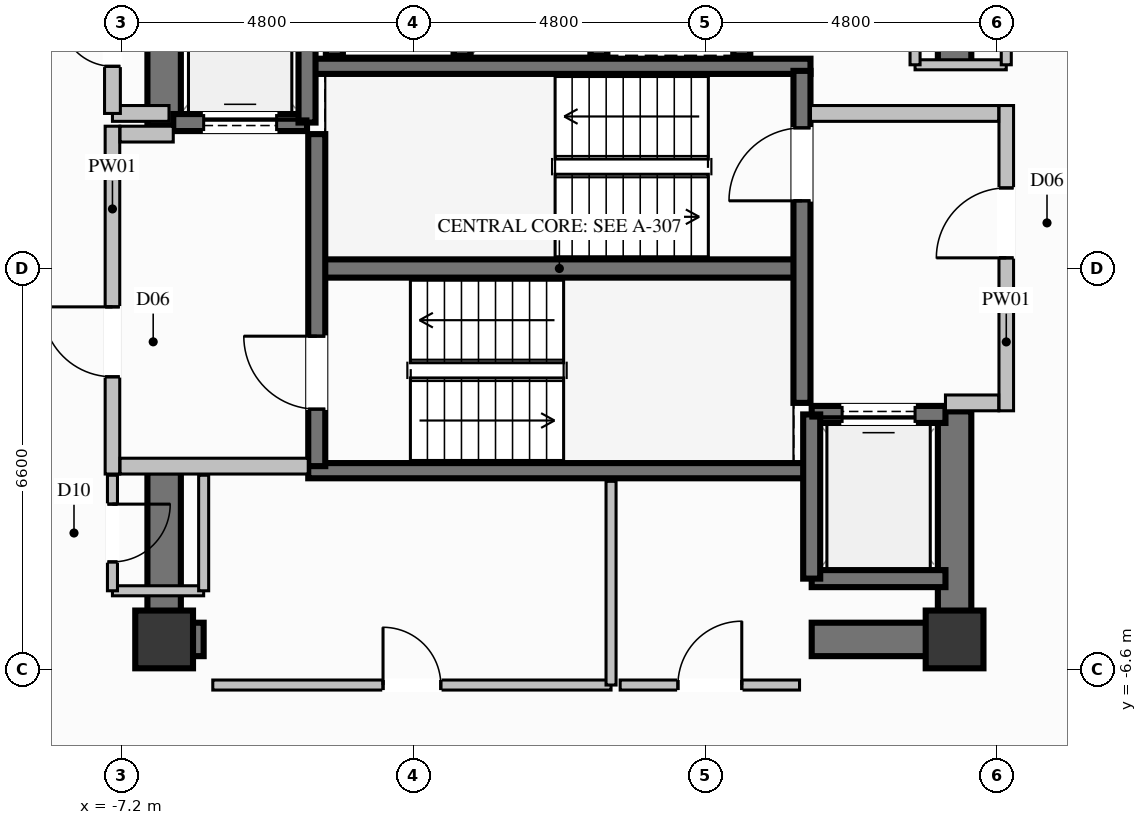
"""IFC4 building model, lengths in metres.
Left out: names, types, materials, properties, quantities, classifications, styles, units other than length and angle.
Written with IfcOpenShell. Run it as: python <this file> out.ifc"""

import sys

from ifc_helpers import new_model, si_unit, direction, frame, frame_2d, origin, origin_2d, place, context, subcontext, project, spatial, rectangle, extrude, element, fill, save


model = new_model("IFC4")
c1 = context("Model", 3, precision=1e-05, world=origin(), true_north=direction((0.0, 1.0)))
c2 = subcontext(c1, "Body", "Model", "MODEL_VIEW")
j1 = project(units=[si_unit("LENGTHUNIT", "METRE"), si_unit("PLANEANGLEUNIT", "RADIAN")], contexts=[c1])
p1 = place(None, origin())
s1 = spatial("IfcSite", under=j1, at=p1, CompositionType="ELEMENT")
p2 = place(p1, origin())
s2 = spatial("IfcBuilding", under=s1, at=p2, CompositionType="ELEMENT")
p3 = place(p2, frame((0.0, 0.0, 227.2)))
s3 = spatial("IfcBuildingStorey", under=s2, at=p3, CompositionType="ELEMENT", Elevation=227.2)
for number, where, z_axis, x_axis in (
    (1, (-6.5, -6.1, 0.0), (0.0, 0.0, 1.0), (1.0, 0.0, 0.0)),
    (2, (6.5, -6.1, 0.0), (0.0, 0.0, 1.0), (1.0, 0.0, 0.0)),
):
    element("IfcColumn", number, at=place(p3, frame(where, z_axis=z_axis, x_axis=x_axis)), inside=s3, PredefinedType="COLUMN", context=c2, shape_type="SweptSolid", body=[
        extrude(rectangle(XDim=0.95, YDim=0.95, at=origin_2d()), origin(), (0.0, 0.0, 1.0), 3.6),
    ])
p4 = place(p3, frame((-3.99, 0.0, 0.0), z_axis=(0.0, 0.0, 1.0), x_axis=(1.0, 0.0, 0.0)))
e3 = element("IfcWall", 3, at=p4, inside=s3, PredefinedType="SHEAR", context=c2, shape_type="SweptSolid", body=[
    extrude(rectangle(XDim=7.98, YDim=0.3, at=frame_2d((3.99, 0.0))), origin(), (0.0, 0.0, 1.0), 3.6),
])
for number, where, z_axis, x_axis in (
    (4, (-4.13, -3.325, 0.0), (0.0, 0.0, 1.0), (1.0, 0.0, 0.0)),
    (5, (-4.13, 3.325, 0.0), (0.0, 0.0, 1.0), (1.0, 0.0, 0.0)),
):
    element("IfcWall", number, at=place(p3, frame(where, z_axis=z_axis, x_axis=x_axis)), inside=s3, PredefinedType="SOLIDWALL", context=c2, shape_type="SweptSolid", body=[
        extrude(rectangle(XDim=8.26, YDim=0.25, at=frame_2d((4.13, 0.0))), origin(), (0.0, 0.0, 1.0), 3.6),
    ])
p5 = place(p3, frame((-6.225, -6.1, 0.0), z_axis=(0.0, 0.0, 1.0), x_axis=(1.0, 0.0, 0.0)))
e6 = element("IfcWall", 6, at=p5, inside=s3, PredefinedType="SHEAR", context=c2, shape_type="SweptSolid", body=[
    extrude(rectangle(XDim=0.375, YDim=0.55, at=frame_2d((0.188, 0.0))), origin(), (0.0, 0.0, 1.0), 3.6),
])
p6 = place(p3, frame((4.15, -6.1, 0.0), z_axis=(0.0, 0.0, 1.0), x_axis=(1.0, 0.0, 0.0)))
e7 = element("IfcWall", 7, at=p6, inside=s3, PredefinedType="SHEAR", context=c2, shape_type="SweptSolid", body=[
    extrude(rectangle(XDim=2.075, YDim=0.55, at=frame_2d((1.038, 0.0))), origin(), (0.0, 0.0, 1.0), 3.6),
])
p7 = place(p3, frame((-6.5, 2.35, 0.0), z_axis=(0.0, 0.0, 1.0), x_axis=(0.0, 1.0, 0.0)))
e8 = element("IfcWall", 8, at=p7, inside=s3, PredefinedType="SHEAR", context=c2, shape_type="SweptSolid", body=[
    extrude(rectangle(XDim=4.025, YDim=0.55, at=frame_2d((2.012, 0.0))), origin(), (0.0, 0.0, 1.0), 3.6),
])
p8 = place(p3, frame((-6.5, -6.375, 0.0), z_axis=(0.0, 0.0, 1.0), x_axis=(0.0, 1.0, 0.0)))
e9 = element("IfcWall", 9, at=p8, inside=s3, PredefinedType="SHEAR", context=c2, shape_type="SweptSolid", body=[
    extrude(rectangle(XDim=3.025, YDim=0.55, at=frame_2d((1.512, 0.0))), origin(), (0.0, 0.0, 1.0), 3.6),
])
p9 = place(p3, frame((6.5, -6.375, 0.0), z_axis=(0.0, 0.0, 1.0), x_axis=(0.0, 1.0, 0.0)))
e10 = element("IfcWall", 10, at=p9, inside=s3, PredefinedType="SHEAR", context=c2, shape_type="SweptSolid", body=[
    extrude(rectangle(XDim=4.025, YDim=0.55, at=frame_2d((2.012, 0.0))), origin(), (0.0, 0.0, 1.0), 3.6),
])
p10 = place(p3, frame((6.5, 3.35, 0.0), z_axis=(0.0, 0.0, 1.0), x_axis=(0.0, 1.0, 0.0)))
e11 = element("IfcWall", 11, at=p10, inside=s3, PredefinedType="SHEAR", context=c2, shape_type="SweptSolid", body=[
    extrude(rectangle(XDim=3.025, YDim=0.55, at=frame_2d((1.512, 0.0))), origin(), (0.0, 0.0, 1.0), 3.6),
])
for number, where, z_axis, x_axis in (
    (12, (-3.7, 6.0, 0.0), (0.0, 0.0, 1.0), (0.0, -1.0, 0.0)),
    (13, (-1.6, 3.5, 0.0), (0.0, 0.0, 1.0), (0.0, 1.0, 0.0)),
    (14, (0.65, 3.5, 0.0), (0.0, 0.0, 1.0), (0.0, 1.0, 0.0)),
    (15, (3.0, 3.5, 0.0), (0.0, 0.0, 1.0), (0.0, 1.0, 0.0)),
):
    element("IfcWall", number, at=place(p3, frame(where, z_axis=z_axis, x_axis=x_axis)), inside=s3, PredefinedType="SOLIDWALL", context=c2, shape_type="SweptSolid", body=[
        extrude(rectangle(XDim=2.5, YDim=0.28, at=frame_2d((1.25, 0.0))), origin(), (0.0, 0.0, 1.0), 3.36),
    ])
p11 = place(p3, frame((-6.35, 2.4, 0.0), z_axis=(0.0, 0.0, 1.0), x_axis=(1.0, 0.0, 0.0)))
e16 = element("IfcWall", 16, at=p11, inside=s3, PredefinedType="SOLIDWALL", context=c2, shape_type="SweptSolid", body=[
    extrude(rectangle(XDim=2.2, YDim=0.28, at=frame_2d((1.1, 0.0))), origin(), (0.0, 0.0, 1.0), 3.36),
])
p12 = place(p11, frame((0.5, 0.0, 0.0)))
e17 = element("IfcOpeningElement", 17, at=p12, cuts=e16, PredefinedType="OPENING", context=c2, shape_type="SweptSolid", body=[
    extrude(rectangle(XDim=1.2, YDim=2.2, at=frame_2d((0.6, 1.1))), frame((0.0, 0.15, 0.0), z_axis=(0.0, -1.0, 0.0), x_axis=(1.0, 0.0, 0.0)), (0.0, 0.0, 1.0), 0.3),
])
p13 = place(p3, frame((-4.15, 2.4, 0.0), z_axis=(0.0, 0.0, 1.0), x_axis=(0.0, 1.0, 0.0)))
e18 = element("IfcWall", 18, at=p13, inside=s3, PredefinedType="SOLIDWALL", context=c2, shape_type="SweptSolid", body=[
    extrude(rectangle(XDim=2.7, YDim=0.28, at=frame_2d((1.35, 0.0))), origin(), (0.0, 0.0, 1.0), 3.36),
])
p14 = place(p3, frame((4.15, -5.1, 0.0), z_axis=(0.0, 0.0, 1.0), x_axis=(1.0, 0.0, 0.0)))
e19 = element("IfcWall", 19, at=p14, inside=s3, PredefinedType="SOLIDWALL", context=c2, shape_type="SweptSolid", body=[
    extrude(rectangle(XDim=2.2, YDim=0.28, at=frame_2d((1.1, 0.0))), origin(), (0.0, 0.0, 1.0), 3.36),
])
p15 = place(p3, frame((6.35, -2.4, 0.0), z_axis=(0.0, 0.0, 1.0), x_axis=(-1.0, 0.0, 0.0)))
e20 = element("IfcWall", 20, at=p15, inside=s3, PredefinedType="SOLIDWALL", context=c2, shape_type="SweptSolid", body=[
    extrude(rectangle(XDim=2.2, YDim=0.28, at=frame_2d((1.1, 0.0))), origin(), (0.0, 0.0, 1.0), 3.36),
])
p16 = place(p15, frame((0.5, 0.0, 0.0)))
e21 = element("IfcOpeningElement", 21, at=p16, cuts=e20, PredefinedType="OPENING", context=c2, shape_type="SweptSolid", body=[
    extrude(rectangle(XDim=1.2, YDim=2.2, at=frame_2d((0.6, 1.1))), frame((0.0, 0.15, 0.0), z_axis=(0.0, -1.0, 0.0), x_axis=(1.0, 0.0, 0.0)), (0.0, 0.0, 1.0), 0.3),
])
p17 = place(p3, frame((4.15, -2.4, 0.0), z_axis=(0.0, 0.0, 1.0), x_axis=(0.0, -1.0, 0.0)))
e22 = element("IfcWall", 22, at=p17, inside=s3, PredefinedType="SOLIDWALL", context=c2, shape_type="SweptSolid", body=[
    extrude(rectangle(XDim=2.7, YDim=0.28, at=frame_2d((1.35, 0.0))), origin(), (0.0, 0.0, 1.0), 3.36),
])
p18 = place(p3, frame((-3.99, -3.25, 0.0), z_axis=(0.0, 0.0, 1.0), x_axis=(0.0, 1.0, 0.0)))
e23 = element("IfcWall", 23, at=p18, inside=s3, PredefinedType="SOLIDWALL", context=c2, shape_type="SweptSolid", body=[
    extrude(rectangle(XDim=5.46, YDim=0.28, at=frame_2d((2.73, 0.0))), origin(), (0.0, 0.0, 1.0), 3.36),
])
p19 = place(p18, frame((0.937, 0.0, 0.0)))
e24 = element("IfcOpeningElement", 24, at=p19, cuts=e23, PredefinedType="OPENING", context=c2, shape_type="SweptSolid", body=[
    extrude(rectangle(XDim=1.2, YDim=2.2, at=frame_2d((0.6, 1.1))), frame((0.0, 0.15, 0.0), z_axis=(0.0, -1.0, 0.0), x_axis=(1.0, 0.0, 0.0)), (0.0, 0.0, 1.0), 0.3),
])
p20 = place(p3, frame((3.99, -2.21, 0.0), z_axis=(0.0, 0.0, 1.0), x_axis=(0.0, 1.0, 0.0)))
e25 = element("IfcWall", 25, at=p20, inside=s3, PredefinedType="SOLIDWALL", context=c2, shape_type="SweptSolid", body=[
    extrude(rectangle(XDim=5.46, YDim=0.28, at=frame_2d((2.73, 0.0))), origin(), (0.0, 0.0, 1.0), 3.36),
])
p21 = place(p20, frame((3.323, 0.0, 0.0)))
e26 = element("IfcOpeningElement", 26, at=p21, cuts=e25, PredefinedType="OPENING", context=c2, shape_type="SweptSolid", body=[
    extrude(rectangle(XDim=1.2, YDim=2.2, at=frame_2d((0.6, 1.1))), frame((0.0, 0.15, 0.0), z_axis=(0.0, -1.0, 0.0), x_axis=(1.0, 0.0, 0.0)), (0.0, 0.0, 1.0), 0.3),
])
p22 = place(p3, frame((-7.35, -3.38, 0.0), z_axis=(0.0, 0.0, 1.0), x_axis=(0.0, 1.0, 0.0)))
e27 = element("IfcWall", 27, at=p22, inside=s3, PredefinedType="PARTITIONING", context=c2, shape_type="SweptSolid", body=[
    extrude(rectangle(XDim=5.72, YDim=0.24, at=frame_2d((2.86, 0.0))), origin(), (0.0, 0.0, 1.0), 2.445),
])
p23 = place(p22, frame((1.599, 0.0, 0.0)))
e28 = element("IfcOpeningElement", 28, at=p23, cuts=e27, PredefinedType="OPENING", context=c2, shape_type="SweptSolid", body=[
    extrude(rectangle(XDim=1.15, YDim=2.2, at=frame_2d((0.575, 1.1))), frame((0.0, 0.13, 0.0), z_axis=(0.0, -1.0, 0.0), x_axis=(1.0, 0.0, 0.0)), (0.0, 0.0, 1.0), 0.26),
])
p24 = place(p3, frame((-7.225, -3.25, 0.0), z_axis=(0.0, 0.0, 1.0), x_axis=(1.0, 0.0, 0.0)))
e29 = element("IfcWall", 29, at=p24, inside=s3, PredefinedType="PARTITIONING", context=c2, shape_type="SweptSolid", body=[
    extrude(rectangle(XDim=3.095, YDim=0.26, at=frame_2d((1.548, 0.0))), origin(), (0.0, 0.0, 1.0), 3.36),
])
p25 = place(p3, frame((-7.225, 2.21, 0.0), z_axis=(0.0, 0.0, 1.0), x_axis=(1.0, 0.0, 0.0)))
e30 = element("IfcWall", 30, at=p25, inside=s3, PredefinedType="PARTITIONING", context=c2, shape_type="SweptSolid", body=[
    extrude(rectangle(XDim=0.875, YDim=0.26, at=frame_2d((0.438, 0.0))), origin(), (0.0, 0.0, 1.0), 3.36),
])
p26 = place(p3, frame((7.35, -2.34, 0.0), z_axis=(0.0, 0.0, 1.0), x_axis=(0.0, 1.0, 0.0)))
e31 = element("IfcWall", 31, at=p26, inside=s3, PredefinedType="PARTITIONING", context=c2, shape_type="SweptSolid", body=[
    extrude(rectangle(XDim=5.02, YDim=0.24, at=frame_2d((2.51, 0.0))), origin(), (0.0, 0.0, 1.0), 2.445),
])
p27 = place(p26, frame((2.515, 0.0, 0.0)))
e32 = element("IfcOpeningElement", 32, at=p27, cuts=e31, PredefinedType="OPENING", context=c2, shape_type="SweptSolid", body=[
    extrude(rectangle(XDim=1.15, YDim=2.2, at=frame_2d((0.575, 1.1))), frame((0.0, 0.13, 0.0), z_axis=(0.0, -1.0, 0.0), x_axis=(1.0, 0.0, 0.0)), (0.0, 0.0, 1.0), 0.26),
])
p28 = place(p3, frame((6.35, -2.21, 0.0), z_axis=(0.0, 0.0, 1.0), x_axis=(1.0, 0.0, 0.0)))
e33 = element("IfcWall", 33, at=p28, inside=s3, PredefinedType="PARTITIONING", context=c2, shape_type="SweptSolid", body=[
    extrude(rectangle(XDim=0.875, YDim=0.26, at=frame_2d((0.438, 0.0))), origin(), (0.0, 0.0, 1.0), 3.36),
])
p29 = place(p3, frame((4.13, 2.55, 0.0), z_axis=(0.0, 0.0, 1.0), x_axis=(1.0, 0.0, 0.0)))
e34 = element("IfcWall", 34, at=p29, inside=s3, PredefinedType="PARTITIONING", context=c2, shape_type="SweptSolid", body=[
    extrude(rectangle(XDim=3.095, YDim=0.26, at=frame_2d((1.548, 0.0))), origin(), (0.0, 0.0, 1.0), 3.36),
])
p30 = place(p3, frame((-7.35, 2.55, 0.0), z_axis=(0.0, 0.0, 1.0), x_axis=(1.0, 0.0, 0.0)))
e35 = element("IfcWall", 35, at=p30, inside=s3, PredefinedType="PARTITIONING", context=c2, shape_type="SweptSolid", body=[
    extrude(rectangle(XDim=0.93, YDim=0.26, at=frame_2d((0.465, 0.0))), origin(), (0.0, 0.0, 1.0), 3.36),
])
p31 = place(p3, frame((-7.35, 2.55, 0.0), z_axis=(0.0, 0.0, 1.0), x_axis=(0.0, 1.0, 0.0)))
e36 = element("IfcWall", 36, at=p31, inside=s3, PredefinedType="PARTITIONING", context=c2, shape_type="SweptSolid", body=[
    extrude(rectangle(XDim=2.4, YDim=0.26, at=frame_2d((1.2, 0.0))), origin(), (0.0, 0.0, 1.0), 2.445),
])
p32 = place(p31, frame((0.775, 0.0, 0.0)))
e37 = element("IfcOpeningElement", 37, at=p32, cuts=e36, PredefinedType="OPENING", context=c2, shape_type="SweptSolid", body=[
    extrude(rectangle(XDim=0.85, YDim=2.05, at=frame_2d((0.425, 1.025))), frame((0.0, 0.14, 0.0), z_axis=(0.0, -1.0, 0.0), x_axis=(1.0, 0.0, 0.0)), (0.0, 0.0, 1.0), 0.28),
])
p33 = place(p3, frame((-7.35, -5.3, 0.0), z_axis=(0.0, 0.0, 1.0), x_axis=(1.0, 0.0, 0.0)))
e38 = element("IfcWall", 38, at=p33, inside=s3, PredefinedType="PARTITIONING", context=c2, shape_type="SweptSolid", body=[
    extrude(rectangle(XDim=1.5, YDim=0.165, at=frame_2d((0.75, 0.0))), origin(), (0.0, 0.0, 1.0), 2.445),
])
p34 = place(p3, frame((-5.85, -5.3, 0.0), z_axis=(0.0, 0.0, 1.0), x_axis=(0.0, 1.0, 0.0)))
e39 = element("IfcWall", 39, at=p34, inside=s3, PredefinedType="PARTITIONING", context=c2, shape_type="SweptSolid", body=[
    extrude(rectangle(XDim=1.9, YDim=0.165, at=frame_2d((0.95, 0.0))), origin(), (0.0, 0.0, 1.0), 2.445),
])
p35 = place(p3, frame((-7.35, -3.4, 0.0), z_axis=(0.0, 0.0, 1.0), x_axis=(0.0, -1.0, 0.0)))
e40 = element("IfcWall", 40, at=p35, inside=s3, PredefinedType="PARTITIONING", context=c2, shape_type="SweptSolid", body=[
    extrude(rectangle(XDim=1.9, YDim=0.165, at=frame_2d((0.95, 0.0))), origin(), (0.0, 0.0, 1.0), 3.36),
])
p36 = place(p35, frame((0.475, 0.0, 0.0)))
e41 = element("IfcOpeningElement", 41, at=p36, cuts=e40, PredefinedType="OPENING", context=c2, shape_type="SweptSolid", body=[
    extrude(rectangle(XDim=0.95, YDim=2.1, at=frame_2d((0.475, 1.05))), frame((0.0, 0.093, 0.0), z_axis=(0.0, -1.0, 0.0), x_axis=(1.0, 0.0, 0.0)), (0.0, 0.0, 1.0), 0.185),
])
p37 = place(p3, frame((5.85, 3.35, 0.0), z_axis=(0.0, 0.0, 1.0), x_axis=(1.0, 0.0, 0.0)))
e42 = element("IfcWall", 42, at=p37, inside=s3, PredefinedType="PARTITIONING", context=c2, shape_type="SweptSolid", body=[
    extrude(rectangle(XDim=1.5, YDim=0.165, at=frame_2d((0.75, 0.0))), origin(), (0.0, 0.0, 1.0), 3.36),
])
p38 = place(p3, frame((7.35, 3.35, 0.0), z_axis=(0.0, 0.0, 1.0), x_axis=(0.0, 1.0, 0.0)))
e43 = element("IfcWall", 43, at=p38, inside=s3, PredefinedType="PARTITIONING", context=c2, shape_type="SweptSolid", body=[
    extrude(rectangle(XDim=1.95, YDim=0.165, at=frame_2d((0.975, 0.0))), origin(), (0.0, 0.0, 1.0), 3.36),
])
p39 = place(p38, frame((0.5, 0.0, 0.0)))
e44 = element("IfcOpeningElement", 44, at=p39, cuts=e43, PredefinedType="OPENING", context=c2, shape_type="SweptSolid", body=[
    extrude(rectangle(XDim=0.95, YDim=2.1, at=frame_2d((0.475, 1.05))), frame((0.0, 0.093, 0.0), z_axis=(0.0, -1.0, 0.0), x_axis=(1.0, 0.0, 0.0)), (0.0, 0.0, 1.0), 0.185),
])
p40 = place(p3, frame((5.85, 5.3, 0.0), z_axis=(0.0, 0.0, 1.0), x_axis=(0.0, -1.0, 0.0)))
e45 = element("IfcWall", 45, at=p40, inside=s3, PredefinedType="PARTITIONING", context=c2, shape_type="SweptSolid", body=[
    extrude(rectangle(XDim=1.95, YDim=0.165, at=frame_2d((0.975, 0.0))), origin(), (0.0, 0.0, 1.0), 2.445),
])
p41 = place(p3, frame((-5.7, -6.85, 0.0), z_axis=(0.0, 0.0, 1.0), x_axis=(1.0, 0.0, 0.0)))
e46 = element("IfcWall", 46, at=p41, inside=s3, PredefinedType="PARTITIONING", context=c2, shape_type="SweptSolid", body=[
    extrude(rectangle(XDim=6.55, YDim=0.165, at=frame_2d((3.275, 0.0))), origin(), (0.0, 0.0, 1.0), 2.445),
])
p42 = place(p41, frame((2.8, 0.0, 0.0)))
e47 = element("IfcOpeningElement", 47, at=p42, cuts=e46, PredefinedType="OPENING", context=c2, shape_type="SweptSolid", body=[
    extrude(rectangle(XDim=0.95, YDim=2.1, at=frame_2d((0.475, 1.05))), frame((0.0, 0.093, 0.0), z_axis=(0.0, -1.0, 0.0), x_axis=(1.0, 0.0, 0.0)), (0.0, 0.0, 1.0), 0.185),
])
p43 = place(p3, frame((0.85, -6.85, 0.0), z_axis=(0.0, 0.0, 1.0), x_axis=(0.0, 1.0, 0.0)))
e48 = element("IfcWall", 48, at=p43, inside=s3, PredefinedType="PARTITIONING", context=c2, shape_type="SweptSolid", body=[
    extrude(rectangle(XDim=3.35, YDim=0.165, at=frame_2d((1.675, 0.0))), origin(), (0.0, 0.0, 1.0), 3.36),
])
p44 = place(p3, frame((1.0, -6.85, 0.0), z_axis=(0.0, 0.0, 1.0), x_axis=(1.0, 0.0, 0.0)))
e49 = element("IfcWall", 49, at=p44, inside=s3, PredefinedType="PARTITIONING", context=c2, shape_type="SweptSolid", body=[
    extrude(rectangle(XDim=2.95, YDim=0.165, at=frame_2d((1.475, 0.0))), origin(), (0.0, 0.0, 1.0), 2.445),
])
p45 = place(p44, frame((0.95, 0.0, 0.0)))
e50 = element("IfcOpeningElement", 50, at=p45, cuts=e49, PredefinedType="OPENING", context=c2, shape_type="SweptSolid", body=[
    extrude(rectangle(XDim=1.05, YDim=2.15, at=frame_2d((0.525, 1.075))), frame((0.0, 0.093, 0.0), z_axis=(0.0, -1.0, 0.0), x_axis=(1.0, 0.0, 0.0)), (0.0, 0.0, 1.0), 0.185),
])
p46 = place(p12, origin())
e51 = element("IfcDoor", 51, at=p46, inside=s3, OperationType="SLIDING_TO_LEFT", PredefinedType="DOOR", context=c2, shape_type="SweptSolid", body=[
    extrude(rectangle(XDim=1.2, YDim=2.2, at=frame_2d((0.6, 1.1))), frame((0.0, 0.025, 0.0), z_axis=(0.0, -1.0, 0.0), x_axis=(1.0, 0.0, 0.0)), (0.0, 0.0, 1.0), 0.05),
])
fill(e17, e51)
p47 = place(p16, origin())
e52 = element("IfcDoor", 52, at=p47, inside=s3, OperationType="SLIDING_TO_LEFT", PredefinedType="DOOR", context=c2, shape_type="SweptSolid", body=[
    extrude(rectangle(XDim=1.2, YDim=2.2, at=frame_2d((0.6, 1.1))), frame((0.0, 0.025, 0.0), z_axis=(0.0, -1.0, 0.0), x_axis=(1.0, 0.0, 0.0)), (0.0, 0.0, 1.0), 0.05),
])
fill(e21, e52)
p48 = place(p19, origin())
e53 = element("IfcDoor", 53, at=p48, inside=s3, OperationType="SINGLE_SWING_RIGHT", PredefinedType="DOOR", context=c2, shape_type="SweptSolid", body=[
    extrude(rectangle(XDim=1.2, YDim=2.2, at=frame_2d((0.6, 1.1))), frame((0.0, 0.025, 0.0), z_axis=(0.0, -1.0, 0.0), x_axis=(1.0, 0.0, 0.0)), (0.0, 0.0, 1.0), 0.05),
])
fill(e24, e53)
p49 = place(p21, origin())
e54 = element("IfcDoor", 54, at=p49, inside=s3, OperationType="SINGLE_SWING_LEFT", PredefinedType="DOOR", context=c2, shape_type="SweptSolid", body=[
    extrude(rectangle(XDim=1.2, YDim=2.2, at=frame_2d((0.6, 1.1))), frame((0.0, 0.025, 0.0), z_axis=(0.0, -1.0, 0.0), x_axis=(1.0, 0.0, 0.0)), (0.0, 0.0, 1.0), 0.05),
])
fill(e26, e54)
p50 = place(p23, origin())
e55 = element("IfcDoor", 55, at=p50, inside=s3, OperationType="SINGLE_SWING_RIGHT", PredefinedType="DOOR", context=c2, shape_type="SweptSolid", body=[
    extrude(rectangle(XDim=1.15, YDim=2.2, at=frame_2d((0.575, 1.1))), frame((0.0, 0.025, 0.0), z_axis=(0.0, -1.0, 0.0), x_axis=(1.0, 0.0, 0.0)), (0.0, 0.0, 1.0), 0.05),
])
fill(e28, e55)
p51 = place(p27, origin())
e56 = element("IfcDoor", 56, at=p51, inside=s3, OperationType="SINGLE_SWING_LEFT", PredefinedType="DOOR", context=c2, shape_type="SweptSolid", body=[
    extrude(rectangle(XDim=1.15, YDim=2.2, at=frame_2d((0.575, 1.1))), frame((0.0, 0.025, 0.0), z_axis=(0.0, -1.0, 0.0), x_axis=(1.0, 0.0, 0.0)), (0.0, 0.0, 1.0), 0.05),
])
fill(e32, e56)
p52 = place(p32, origin())
e57 = element("IfcDoor", 57, at=p52, inside=s3, OperationType="SINGLE_SWING_RIGHT", PredefinedType="DOOR", context=c2, shape_type="SweptSolid", body=[
    extrude(rectangle(XDim=0.85, YDim=2.05, at=frame_2d((0.425, 1.025))), frame((0.0, 0.025, 0.0), z_axis=(0.0, -1.0, 0.0), x_axis=(1.0, 0.0, 0.0)), (0.0, 0.0, 1.0), 0.05),
])
fill(e37, e57)
p53 = place(p36, origin())
e58 = element("IfcDoor", 58, at=p53, inside=s3, OperationType="SINGLE_SWING_LEFT", PredefinedType="DOOR", context=c2, shape_type="SweptSolid", body=[
    extrude(rectangle(XDim=0.95, YDim=2.1, at=frame_2d((0.475, 1.05))), frame((0.0, 0.025, 0.0), z_axis=(0.0, -1.0, 0.0), x_axis=(1.0, 0.0, 0.0)), (0.0, 0.0, 1.0), 0.05),
])
fill(e41, e58)
p54 = place(p42, origin())
e59 = element("IfcDoor", 59, at=p54, inside=s3, OperationType="SINGLE_SWING_LEFT", PredefinedType="DOOR", context=c2, shape_type="SweptSolid", body=[
    extrude(rectangle(XDim=0.95, YDim=2.1, at=frame_2d((0.475, 1.05))), frame((0.0, 0.025, 0.0), z_axis=(0.0, -1.0, 0.0), x_axis=(1.0, 0.0, 0.0)), (0.0, 0.0, 1.0), 0.05),
])
fill(e47, e59)
p55 = place(p45, origin())
e60 = element("IfcDoor", 60, at=p55, inside=s3, OperationType="SINGLE_SWING_RIGHT", PredefinedType="DOOR", context=c2, shape_type="SweptSolid", body=[
    extrude(rectangle(XDim=1.05, YDim=2.15, at=frame_2d((0.525, 1.075))), frame((0.0, 0.025, 0.0), z_axis=(0.0, -1.0, 0.0), x_axis=(1.0, 0.0, 0.0)), (0.0, 0.0, 1.0), 0.05),
])
fill(e50, e60)
save(model, sys.argv[1])
